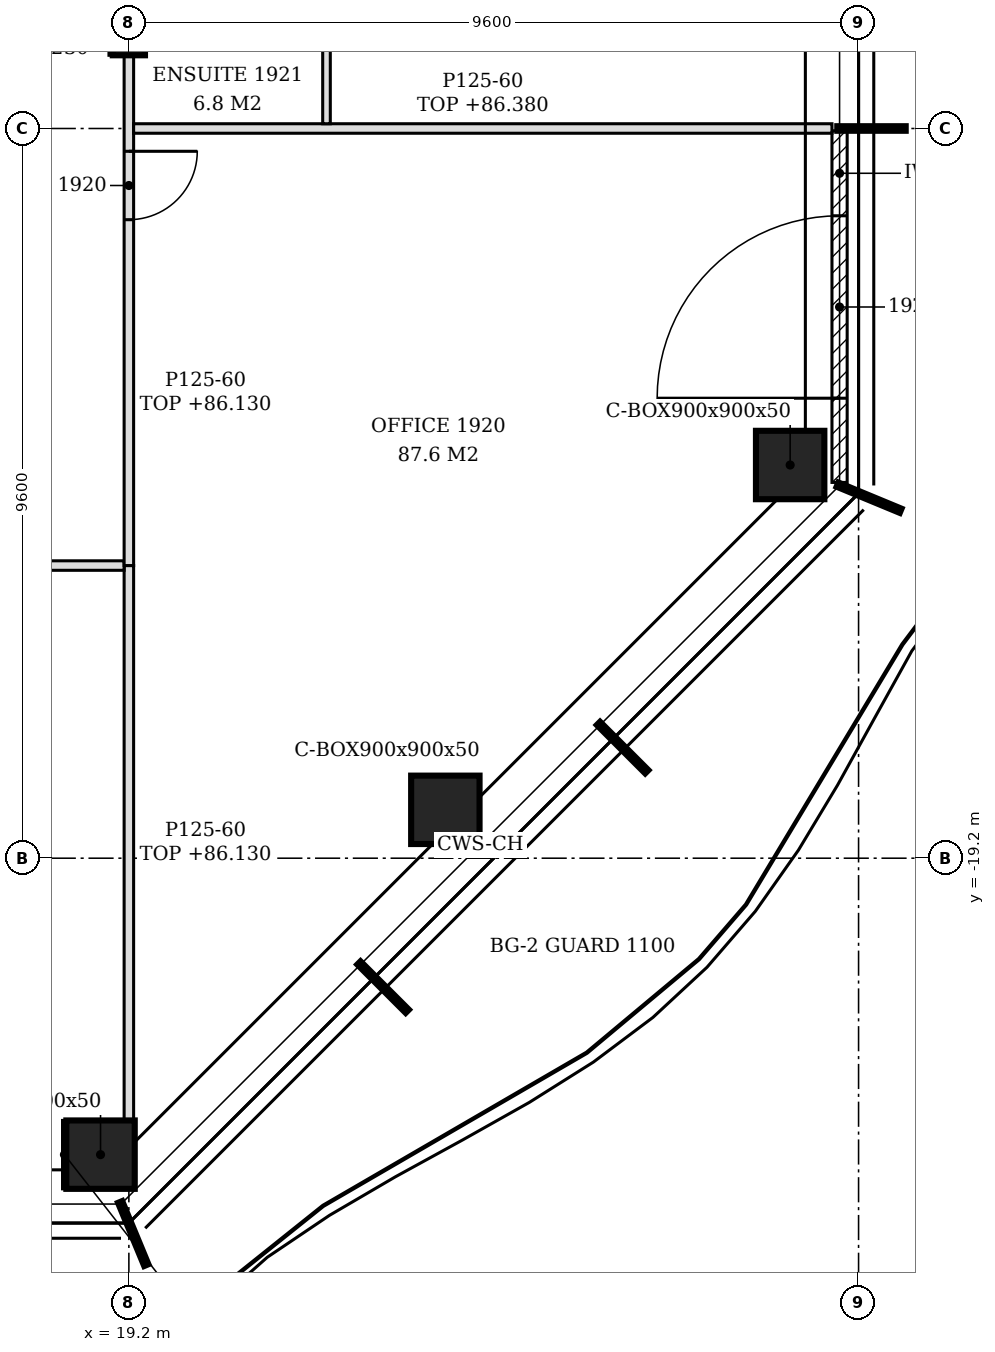
"""IFC4 building model, lengths in metres.
Left out: names, types, materials, properties, quantities, classifications, styles, units other than length and angle.
Written with IfcOpenShell. Run it as: python <this file> out.ifc"""

import sys

from ifc_helpers import new_model, si_unit, direction, frame, frame_2d, origin, origin_2d, place, context, subcontext, project, spatial, polyline, rectangle, hollow_rectangle, i_section, outline, extrude, clip, halfspace, element, fill, save


model = new_model("IFC4")
c1 = context("Model", 3, precision=1e-05, world=origin(), true_north=direction((0.0, 1.0)))
c2 = subcontext(c1, "Body", "Model", "MODEL_VIEW")
j1 = project(units=[si_unit("LENGTHUNIT", "METRE"), si_unit("PLANEANGLEUNIT", "RADIAN")], contexts=[c1])
p1 = place(None, origin())
s1 = spatial("IfcSite", under=j1, at=p1, CompositionType="ELEMENT")
p2 = place(p1, origin())
s2 = spatial("IfcBuilding", under=s1, at=p2, CompositionType="ELEMENT")
p3 = place(p2, frame((0.0, 0.0, 83.4)))
s3 = spatial("IfcBuildingStorey", under=s2, at=p3, CompositionType="ELEMENT", Elevation=83.4)
for number, where, z_axis, x_axis in (
    (1, (18.827, -23.1, -0.15), (0.0, 0.0, 1.0), (1.0, 0.0, 0.0)),
    (2, (23.364, -18.564, -0.15), (0.0, 0.0, 1.0), (1.0, 0.0, 0.0)),
    (3, (27.9, -14.027, -0.15), (0.0, 0.0, 1.0), (1.0, 0.0, 0.0)),
):
    element("IfcColumn", number, at=place(p3, frame(where, z_axis=z_axis, x_axis=x_axis)), inside=s3, PredefinedType="COLUMN", context=c2, shape_type="Clipping", body=[
        clip(extrude(hollow_rectangle(XDim=0.9, YDim=0.9, WallThickness=0.05, at=origin_2d()), origin(), (0.0, 0.0, 1.0), 3.6), halfspace(frame((0.0, 0.0, 3.576), z_axis=(0.0, 0.0, 1.0), x_axis=(1.0, 0.0, 0.0)), False)),
    ])
p4 = place(p3, frame((19.2, -8.4, -0.15), z_axis=(0.0, 0.0, 1.0), x_axis=(1.0, 0.0, 0.0)))
e4 = element("IfcColumn", 4, at=p4, inside=s3, PredefinedType="COLUMN", context=c2, shape_type="SweptSolid", body=[
    extrude(i_section(OverallWidth=0.424, OverallDepth=0.474, WebThickness=0.048, FlangeThickness=0.077, FilletRadius=0.015, at=origin_2d()), origin(), (0.0, 0.0, 1.0), 3.6),
])
p5 = place(p3, frame((28.55, -14.256, 0.0), z_axis=(0.0, 0.0, 1.0), x_axis=(0.0, 1.0, 0.0)))
e5 = element("IfcWall", 5, at=p5, inside=s3, PredefinedType="NOTDEFINED", context=c2, shape_type="SweptSolid", body=[
    extrude(rectangle(XDim=4.626, YDim=0.2, at=frame_2d((2.313, 0.0))), origin(), (0.0, 0.0, 1.0), 3.45),
])
p6 = place(p5, frame((1.108, 0.0, 0.0)))
e6 = element("IfcOpeningElement", 6, at=p6, cuts=e5, PredefinedType="OPENING", context=c2, shape_type="SweptSolid", body=[
    extrude(rectangle(XDim=2.4, YDim=2.4, at=frame_2d((1.2, 1.2))), frame((0.0, 0.11, 0.0), z_axis=(0.0, -1.0, 0.0), x_axis=(1.0, 0.0, 0.0)), (0.0, 0.0, 1.0), 0.22),
])
p7 = place(p3, frame((19.2, -22.65, 0.0), z_axis=(0.0, 0.0, 1.0), x_axis=(0.0, 1.0, 0.0)))
e7 = element("IfcWall", 7, at=p7, inside=s3, PredefinedType="PARTITIONING", context=c2, shape_type="SweptSolid", body=[
    extrude(outline(polyline([(0.0, 0.0), (7.3, 0.0), (7.3, 2.73), (0.48, 2.73), (0.478, 2.63), (0.0, 2.63), (0.0, 0.0)])), frame((0.0, 0.062, 0.0), z_axis=(0.0, -1.0, 0.0), x_axis=(1.0, 0.0, 0.0)), (0.0, 0.0, 1.0), 0.125),
])
p8 = place(p3, frame((-22.75, -15.35, 0.0), z_axis=(0.0, 0.0, 1.0), x_axis=(1.0, 0.0, 0.0)))
e8 = element("IfcWall", 8, at=p8, inside=s3, PredefinedType="PARTITIONING", context=c2, shape_type="SweptSolid", body=[
    extrude(outline(polyline([(0.0, 0.0), (41.887, 0.0), (41.887, 2.73), (41.8, 2.73), (41.798, 3.45), (30.1, 3.45), (30.098, 2.73), (29.8, 2.73), (29.798, 3.45), (18.1, 3.45), (18.098, 2.73), (17.8, 2.73), (17.798, 3.45), (8.5, 3.45), (8.498, 2.93), (8.2, 2.93), (8.198, 3.45), (0.0, 3.45), (0.0, 0.0)])), frame((0.0, 0.062, 0.0), z_axis=(0.0, -1.0, 0.0), x_axis=(1.0, 0.0, 0.0)), (0.0, 0.0, 1.0), 0.125),
])
p9 = place(p8, frame((7.15, 0.0, 0.0)))
e9 = element("IfcOpeningElement", 9, at=p9, cuts=e8, PredefinedType="OPENING", context=c2, shape_type="SweptSolid", body=[
    extrude(rectangle(XDim=0.9, YDim=2.1, at=frame_2d((0.45, 1.05))), frame((0.0, 0.073, 0.0), z_axis=(0.0, -1.0, 0.0), x_axis=(1.0, 0.0, 0.0)), (0.0, 0.0, 1.0), 0.145),
])
p10 = place(p8, frame((9.736, 0.0, 0.0)))
e10 = element("IfcOpeningElement", 10, at=p10, cuts=e8, PredefinedType="OPENING", context=c2, shape_type="SweptSolid", body=[
    extrude(rectangle(XDim=0.9, YDim=2.1, at=frame_2d((0.45, 1.05))), frame((0.0, 0.073, 0.0), z_axis=(0.0, -1.0, 0.0), x_axis=(1.0, 0.0, 0.0)), (0.0, 0.0, 1.0), 0.145),
])
p11 = place(p8, frame((16.75, 0.0, 0.0)))
e11 = element("IfcOpeningElement", 11, at=p11, cuts=e8, PredefinedType="OPENING", context=c2, shape_type="SweptSolid", body=[
    extrude(rectangle(XDim=0.9, YDim=2.1, at=frame_2d((0.45, 1.05))), frame((0.0, 0.073, 0.0), z_axis=(0.0, -1.0, 0.0), x_axis=(1.0, 0.0, 0.0)), (0.0, 0.0, 1.0), 0.145),
])
p12 = place(p8, frame((19.15, 0.0, 0.0)))
e12 = element("IfcOpeningElement", 12, at=p12, cuts=e8, PredefinedType="OPENING", context=c2, shape_type="SweptSolid", body=[
    extrude(rectangle(XDim=0.9, YDim=2.1, at=frame_2d((0.45, 1.05))), frame((0.0, 0.073, 0.0), z_axis=(0.0, -1.0, 0.0), x_axis=(1.0, 0.0, 0.0)), (0.0, 0.0, 1.0), 0.145),
])
p13 = place(p8, frame((23.95, 0.0, 0.0)))
e13 = element("IfcOpeningElement", 13, at=p13, cuts=e8, PredefinedType="OPENING", context=c2, shape_type="SweptSolid", body=[
    extrude(rectangle(XDim=0.9, YDim=2.1, at=frame_2d((0.45, 1.05))), frame((0.0, 0.073, 0.0), z_axis=(0.0, -1.0, 0.0), x_axis=(1.0, 0.0, 0.0)), (0.0, 0.0, 1.0), 0.145),
])
p14 = place(p8, frame((30.964, 0.0, 0.0)))
e14 = element("IfcOpeningElement", 14, at=p14, cuts=e8, PredefinedType="OPENING", context=c2, shape_type="SweptSolid", body=[
    extrude(rectangle(XDim=0.9, YDim=2.1, at=frame_2d((0.45, 1.05))), frame((0.0, 0.073, 0.0), z_axis=(0.0, -1.0, 0.0), x_axis=(1.0, 0.0, 0.0)), (0.0, 0.0, 1.0), 0.145),
])
p15 = place(p8, frame((34.95, 0.0, 0.0)))
e15 = element("IfcOpeningElement", 15, at=p15, cuts=e8, PredefinedType="OPENING", context=c2, shape_type="SweptSolid", body=[
    extrude(rectangle(XDim=0.9, YDim=2.1, at=frame_2d((0.45, 1.05))), frame((0.0, 0.073, 0.0), z_axis=(0.0, -1.0, 0.0), x_axis=(1.0, 0.0, 0.0)), (0.0, 0.0, 1.0), 0.145),
])
p16 = place(p8, frame((39.95, 0.0, 0.0)))
e16 = element("IfcOpeningElement", 16, at=p16, cuts=e8, PredefinedType="OPENING", context=c2, shape_type="SweptSolid", body=[
    extrude(rectangle(XDim=0.9, YDim=2.1, at=frame_2d((0.45, 1.05))), frame((0.0, 0.073, 0.0), z_axis=(0.0, -1.0, 0.0), x_axis=(1.0, 0.0, 0.0)), (0.0, 0.0, 1.0), 0.145),
])
p17 = place(p3, frame((19.2, -15.35, 0.0), z_axis=(0.0, 0.0, 1.0), x_axis=(0.0, 1.0, 0.0)))
e17 = element("IfcWall", 17, at=p17, inside=s3, PredefinedType="PARTITIONING", context=c2, shape_type="SweptSolid", body=[
    extrude(rectangle(XDim=6.713, YDim=0.125, at=frame_2d((3.356, 0.0))), origin(), (0.0, 0.0, 1.0), 2.73),
])
p18 = place(p17, frame((4.55, 0.0, 0.0)))
e18 = element("IfcOpeningElement", 18, at=p18, cuts=e17, PredefinedType="OPENING", context=c2, shape_type="SweptSolid", body=[
    extrude(rectangle(XDim=0.9, YDim=2.1, at=frame_2d((0.45, 1.05))), frame((0.0, 0.073, 0.0), z_axis=(0.0, -1.0, 0.0), x_axis=(1.0, 0.0, 0.0)), (0.0, 0.0, 1.0), 0.145),
])
p19 = place(p3, frame((19.262, -9.6, 0.0), z_axis=(0.0, 0.0, 1.0), x_axis=(1.0, 0.0, 0.0)))
e19 = element("IfcWall", 19, at=p19, inside=s3, PredefinedType="PARTITIONING", context=c2, shape_type="SweptSolid", body=[
    extrude(outline(polyline([(0.0, 0.0), (9.188, 0.0), (9.188, 2.98), (8.788, 2.98), (8.785, 2.93), (8.488, 2.93), (8.486, 2.98), (0.087, 2.98), (0.085, 2.73), (0.0, 2.73), (0.0, 0.0)])), frame((0.0, 0.062, 0.0), z_axis=(0.0, -1.0, 0.0), x_axis=(1.0, 0.0, 0.0)), (0.0, 0.0, 1.0), 0.125),
])
p20 = place(p3, frame((21.8, -9.538, 0.0), z_axis=(0.0, 0.0, 1.0), x_axis=(0.0, 1.0, 0.0)))
e20 = element("IfcWall", 20, at=p20, inside=s3, PredefinedType="PARTITIONING", context=c2, shape_type="SweptSolid", body=[
    extrude(outline(polyline([(0.0, 0.0), (2.488, 0.0), (2.488, 3.45), (0.032, 3.45), (0.031, 2.98), (0.0, 2.98), (0.0, 0.0)])), frame((0.0, 0.05, 0.0), z_axis=(0.0, -1.0, 0.0), x_axis=(1.0, 0.0, 0.0)), (0.0, 0.0, 1.0), 0.1),
])
p21 = place(p3, frame((18.352, -23.55, 0.0), z_axis=(0.0, 0.0, 1.0), x_axis=(0.0, 1.0, 0.0)))
e21 = element("IfcWall", 21, at=p21, inside=s3, PredefinedType="PARTITIONING", context=c2, shape_type="SweptSolid", body=[
    extrude(rectangle(XDim=0.9, YDim=0.05, at=frame_2d((0.45, 0.0))), origin(), (0.0, 0.0, 1.0), 2.93),
])
p22 = place(p3, frame((18.963, -8.637, 0.0), z_axis=(0.0, 0.0, 1.0), x_axis=(0.0, 1.0, 0.0)))
e22 = element("IfcWall", 22, at=p22, inside=s3, PredefinedType="PARTITIONING", context=c2, shape_type="SweptSolid", body=[
    extrude(rectangle(XDim=0.474, YDim=0.05, at=frame_2d((0.237, 0.0))), origin(), (0.0, 0.0, 1.0), 2.83),
])
p23 = place(p6, origin())
e23 = element("IfcDoor", 23, at=p23, inside=s3, OperationType="SINGLE_SWING_LEFT", PredefinedType="DOOR", context=c2, shape_type="SweptSolid", body=[
    extrude(rectangle(XDim=2.4, YDim=2.4, at=frame_2d((1.2, 1.2))), frame((0.0, 0.025, 0.0), z_axis=(0.0, -1.0, 0.0), x_axis=(1.0, 0.0, 0.0)), (0.0, 0.0, 1.0), 0.05),
])
fill(e6, e23)
p24 = place(p18, frame((0.9, 0.0, 0.0), z_axis=(0.0, 0.0, 1.0), x_axis=(-1.0, 0.0, 0.0)))
e24 = element("IfcDoor", 24, at=p24, inside=s3, OperationType="SINGLE_SWING_LEFT", PredefinedType="DOOR", context=c2, shape_type="SweptSolid", body=[
    extrude(rectangle(XDim=0.9, YDim=2.1, at=frame_2d((0.45, 1.05))), frame((0.0, 0.025, 0.0), z_axis=(0.0, -1.0, 0.0), x_axis=(1.0, 0.0, 0.0)), (0.0, 0.0, 1.0), 0.05),
])
fill(e18, e24)
save(model, sys.argv[1])
